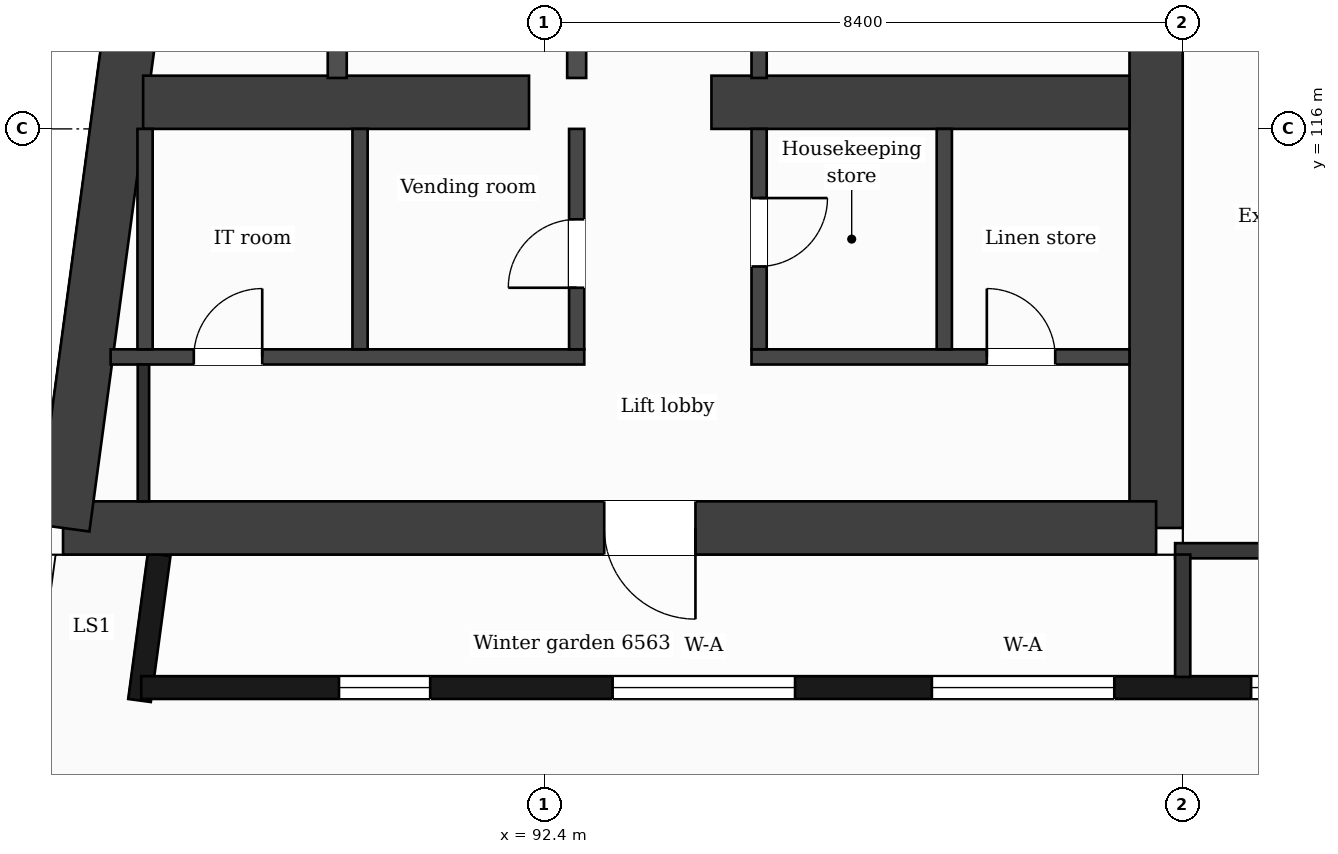
"""IFC4 building model, lengths in metres.
Left out: names, types, materials, properties, quantities, classifications, styles, units other than length and angle.
Written with IfcOpenShell. Run it as: python <this file> out.ifc"""

import sys

from ifc_helpers import new_model, si_unit, direction, frame, frame_2d, origin, place, context, subcontext, project, spatial, rectangle, extrude, element, fill, save


model = new_model("IFC4")
c1 = context("Model", 3, precision=1e-05, world=origin(), true_north=direction((0.0, 1.0)))
c2 = subcontext(c1, "Body", "Model", "MODEL_VIEW")
j1 = project(units=[si_unit("LENGTHUNIT", "METRE"), si_unit("PLANEANGLEUNIT", "RADIAN")], contexts=[c1])
p1 = place(None, origin())
s1 = spatial("IfcSite", under=j1, at=p1, CompositionType="ELEMENT")
p2 = place(p1, origin())
s2 = spatial("IfcBuilding", under=s1, at=p2, CompositionType="ELEMENT")
p3 = place(p2, frame((0.0, 0.0, 270.1)))
s3 = spatial("IfcBuildingStorey", under=s2, at=p3, CompositionType="ELEMENT", Elevation=270.1)
p4 = place(p3, frame((100.45, 132.05, 0.0), z_axis=(0.0, 0.0, 1.0), x_axis=(0.0, -1.0, 0.0)))
e1 = element("IfcWall", 1, at=p4, inside=s3, PredefinedType="SHEAR", context=c2, shape_type="SweptSolid", body=[
    extrude(rectangle(XDim=21.3, YDim=0.7, at=frame_2d((10.65, 0.0))), origin(), (0.0, 0.0, 1.0), 3.7),
])
p5 = place(p4, frame((7.9, 0.0, 0.0)))
e2 = element("IfcOpeningElement", 2, at=p5, cuts=e1, PredefinedType="OPENING", context=c2, shape_type="SweptSolid", body=[
    extrude(rectangle(XDim=1.4, YDim=2.1, at=frame_2d((0.7, 1.05))), frame((0.0, 0.36, 0.0), z_axis=(0.0, -1.0, 0.0), x_axis=(1.0, 0.0, 0.0)), (0.0, 0.0, 1.0), 0.72),
])
p6 = place(p3, frame((100.45, 110.75, 0.0), z_axis=(0.0, 0.0, 1.0), x_axis=(-1.0, 0.0, 0.0)))
e3 = element("IfcWall", 3, at=p6, inside=s3, PredefinedType="SHEAR", context=c2, shape_type="SweptSolid", body=[
    extrude(rectangle(XDim=14.38, YDim=0.7, at=frame_2d((7.19, 0.0))), origin(), (0.0, 0.0, 1.0), 3.7),
])
p7 = place(p6, frame((6.06, 0.0, 0.0)))
e4 = element("IfcOpeningElement", 4, at=p7, cuts=e3, PredefinedType="OPENING", context=c2, shape_type="SweptSolid", body=[
    extrude(rectangle(XDim=1.2, YDim=2.1, at=frame_2d((0.6, 1.05))), frame((0.0, 0.36, 0.0), z_axis=(0.0, -1.0, 0.0), x_axis=(1.0, 0.0, 0.0)), (0.0, 0.0, 1.0), 0.72),
])
p8 = place(p3, frame((86.07, 110.75, 0.0), z_axis=(0.0, 0.0, 1.0), x_axis=(0.133406218907, 0.991061441464, 0.0)))
e5 = element("IfcWall", 5, at=p8, inside=s3, PredefinedType="SHEAR", context=c2, shape_type="SweptSolid", body=[
    extrude(rectangle(XDim=21.492, YDim=0.7, at=frame_2d((10.746, 0.0))), origin(), (0.0, 0.0, 1.0), 3.7),
])
p9 = place(p3, frame((87.123, 116.35, 0.0), z_axis=(0.0, 0.0, 1.0), x_axis=(1.0, 0.0, 0.0)))
e6 = element("IfcWall", 6, at=p9, inside=s3, PredefinedType="SHEAR", context=c2, shape_type="SweptSolid", body=[
    extrude(rectangle(XDim=5.077, YDim=0.7, at=frame_2d((2.539, 0.0))), origin(), (0.0, 0.0, 1.0), 3.7),
])
p10 = place(p3, frame((94.6, 116.35, 0.0), z_axis=(0.0, 0.0, 1.0), x_axis=(1.0, 0.0, 0.0)))
e7 = element("IfcWall", 7, at=p10, inside=s3, PredefinedType="SHEAR", context=c2, shape_type="SweptSolid", body=[
    extrude(rectangle(XDim=5.5, YDim=0.7, at=frame_2d((2.75, 0.0))), origin(), (0.0, 0.0, 1.0), 3.7),
])
p11 = place(p3, frame((87.334, 110.4, 0.0), z_axis=(0.0, 0.0, 1.0), x_axis=(-0.13345962011, -0.991054251694, 0.0)))
e8 = element("IfcWall", 8, at=p11, inside=s3, PredefinedType="SOLIDWALL", context=c2, shape_type="SweptSolid", body=[
    extrude(rectangle(XDim=1.937, YDim=0.3, at=frame_2d((0.969, 0.0))), origin(), (0.0, 0.0, 1.0), 3.38),
])
p12 = place(p3, frame((87.099, 108.65, 0.0), z_axis=(0.0, 0.0, 1.0), x_axis=(1.0, 0.0, 0.0)))
e9 = element("IfcWall", 9, at=p12, inside=s3, PredefinedType="SOLIDWALL", context=c2, shape_type="SweptSolid", body=[
    extrude(rectangle(XDim=52.774, YDim=0.3, at=frame_2d((26.387, 0.0))), origin(), (0.0, 0.0, 1.0), 3.38),
])
p13 = place(p12, frame((2.602, 0.0, 0.9)))
e10 = element("IfcOpeningElement", 10, at=p13, cuts=e9, PredefinedType="OPENING", context=c2, shape_type="SweptSolid", body=[
    extrude(rectangle(XDim=1.2, YDim=2.1, at=frame_2d((0.6, 1.05))), frame((0.0, 0.16, 0.0), z_axis=(0.0, -1.0, 0.0), x_axis=(1.0, 0.0, 0.0)), (0.0, 0.0, 1.0), 0.32),
])
p14 = place(p12, frame((6.201, 0.0, 0.9)))
e11 = element("IfcOpeningElement", 11, at=p14, cuts=e9, PredefinedType="OPENING", context=c2, shape_type="SweptSolid", body=[
    extrude(rectangle(XDim=2.4, YDim=2.1, at=frame_2d((1.2, 1.05))), frame((0.0, 0.16, 0.0), z_axis=(0.0, -1.0, 0.0), x_axis=(1.0, 0.0, 0.0)), (0.0, 0.0, 1.0), 0.32),
])
p15 = place(p12, frame((10.401, 0.0, 0.9)))
e12 = element("IfcOpeningElement", 12, at=p15, cuts=e9, PredefinedType="OPENING", context=c2, shape_type="SweptSolid", body=[
    extrude(rectangle(XDim=2.4, YDim=2.1, at=frame_2d((1.2, 1.05))), frame((0.0, 0.16, 0.0), z_axis=(0.0, -1.0, 0.0), x_axis=(1.0, 0.0, 0.0)), (0.0, 0.0, 1.0), 0.32),
])
p16 = place(p12, frame((14.602, 0.0, 0.9)))
e13 = element("IfcOpeningElement", 13, at=p16, cuts=e9, PredefinedType="OPENING", context=c2, shape_type="SweptSolid", body=[
    extrude(rectangle(XDim=2.4, YDim=2.1, at=frame_2d((1.2, 1.05))), frame((0.0, 0.16, 0.0), z_axis=(0.0, -1.0, 0.0), x_axis=(1.0, 0.0, 0.0)), (0.0, 0.0, 1.0), 0.32),
])
p17 = place(p12, frame((18.802, 0.0, 0.9)))
e14 = element("IfcOpeningElement", 14, at=p17, cuts=e9, PredefinedType="OPENING", context=c2, shape_type="SweptSolid", body=[
    extrude(rectangle(XDim=2.4, YDim=2.1, at=frame_2d((1.2, 1.05))), frame((0.0, 0.16, 0.0), z_axis=(0.0, -1.0, 0.0), x_axis=(1.0, 0.0, 0.0)), (0.0, 0.0, 1.0), 0.32),
])
p18 = place(p12, frame((23.001, 0.0, 0.9)))
e15 = element("IfcOpeningElement", 15, at=p18, cuts=e9, PredefinedType="OPENING", context=c2, shape_type="SweptSolid", body=[
    extrude(rectangle(XDim=2.4, YDim=2.1, at=frame_2d((1.2, 1.05))), frame((0.0, 0.16, 0.0), z_axis=(0.0, -1.0, 0.0), x_axis=(1.0, 0.0, 0.0)), (0.0, 0.0, 1.0), 0.32),
])
p19 = place(p12, frame((27.802, 0.0, 0.9)))
e16 = element("IfcOpeningElement", 16, at=p19, cuts=e9, PredefinedType="OPENING", context=c2, shape_type="SweptSolid", body=[
    extrude(rectangle(XDim=1.2, YDim=2.1, at=frame_2d((0.6, 1.05))), frame((0.0, 0.16, 0.0), z_axis=(0.0, -1.0, 0.0), x_axis=(1.0, 0.0, 0.0)), (0.0, 0.0, 1.0), 0.32),
])
p20 = place(p12, frame((32.001, 0.0, 0.9)))
e17 = element("IfcOpeningElement", 17, at=p20, cuts=e9, PredefinedType="OPENING", context=c2, shape_type="SweptSolid", body=[
    extrude(rectangle(XDim=1.2, YDim=2.1, at=frame_2d((0.6, 1.05))), frame((0.0, 0.16, 0.0), z_axis=(0.0, -1.0, 0.0), x_axis=(1.0, 0.0, 0.0)), (0.0, 0.0, 1.0), 0.32),
])
p21 = place(p12, frame((35.302, 0.0, 0.0)))
e18 = element("IfcOpeningElement", 18, at=p21, cuts=e9, PredefinedType="OPENING", context=c2, shape_type="SweptSolid", body=[
    extrude(rectangle(XDim=1.2, YDim=2.4, at=frame_2d((0.6, 1.2))), frame((0.0, 0.16, 0.0), z_axis=(0.0, -1.0, 0.0), x_axis=(1.0, 0.0, 0.0)), (0.0, 0.0, 1.0), 0.32),
])
p22 = place(p12, frame((37.102, 0.0, 0.9)))
e19 = element("IfcOpeningElement", 19, at=p22, cuts=e9, PredefinedType="OPENING", context=c2, shape_type="SweptSolid", body=[
    extrude(rectangle(XDim=1.2, YDim=2.1, at=frame_2d((0.6, 1.05))), frame((0.0, 0.16, 0.0), z_axis=(0.0, -1.0, 0.0), x_axis=(1.0, 0.0, 0.0)), (0.0, 0.0, 1.0), 0.32),
])
p23 = place(p12, frame((39.802, 0.0, 0.9)))
e20 = element("IfcOpeningElement", 20, at=p23, cuts=e9, PredefinedType="OPENING", context=c2, shape_type="SweptSolid", body=[
    extrude(rectangle(XDim=2.4, YDim=2.1, at=frame_2d((1.2, 1.05))), frame((0.0, 0.16, 0.0), z_axis=(0.0, -1.0, 0.0), x_axis=(1.0, 0.0, 0.0)), (0.0, 0.0, 1.0), 0.32),
])
p24 = place(p12, frame((43.701, 0.0, 0.0)))
e21 = element("IfcOpeningElement", 21, at=p24, cuts=e9, PredefinedType="OPENING", context=c2, shape_type="SweptSolid", body=[
    extrude(rectangle(XDim=1.2, YDim=2.4, at=frame_2d((0.6, 1.2))), frame((0.0, 0.16, 0.0), z_axis=(0.0, -1.0, 0.0), x_axis=(1.0, 0.0, 0.0)), (0.0, 0.0, 1.0), 0.32),
])
p25 = place(p12, frame((45.501, 0.0, 0.9)))
e22 = element("IfcOpeningElement", 22, at=p25, cuts=e9, PredefinedType="OPENING", context=c2, shape_type="SweptSolid", body=[
    extrude(rectangle(XDim=1.2, YDim=2.1, at=frame_2d((0.6, 1.05))), frame((0.0, 0.16, 0.0), z_axis=(0.0, -1.0, 0.0), x_axis=(1.0, 0.0, 0.0)), (0.0, 0.0, 1.0), 0.32),
])
p26 = place(p12, frame((48.201, 0.0, 0.9)))
e23 = element("IfcOpeningElement", 23, at=p26, cuts=e9, PredefinedType="OPENING", context=c2, shape_type="SweptSolid", body=[
    extrude(rectangle(XDim=2.4, YDim=2.1, at=frame_2d((1.2, 1.05))), frame((0.0, 0.16, 0.0), z_axis=(0.0, -1.0, 0.0), x_axis=(1.0, 0.0, 0.0)), (0.0, 0.0, 1.0), 0.32),
])
p27 = place(p3, frame((100.7, 110.45, 0.0), z_axis=(0.0, 0.0, 1.0), x_axis=(1.0, 0.0, 0.0)))
e24 = element("IfcWall", 24, at=p27, inside=s3, PredefinedType="PARTITIONING", context=c2, shape_type="SweptSolid", body=[
    extrude(rectangle(XDim=25.4, YDim=0.2, at=frame_2d((12.7, 0.0))), origin(), (0.0, 0.0, 1.0), 3.38),
])
p28 = place(p3, frame((86.696, 113.0, 0.0), z_axis=(0.0, 0.0, 1.0), x_axis=(1.0, 0.0, 0.0)))
e25 = element("IfcWall", 25, at=p28, inside=s3, PredefinedType="PARTITIONING", context=c2, shape_type="SweptSolid", body=[
    extrude(rectangle(XDim=6.231, YDim=0.2, at=frame_2d((3.116, 0.0))), origin(), (0.0, 0.0, 1.0), 3.38),
])
p29 = place(p28, frame((1.094, 0.0, 0.0)))
e26 = element("IfcOpeningElement", 26, at=p29, cuts=e25, PredefinedType="OPENING", context=c2, shape_type="SweptSolid", body=[
    extrude(rectangle(XDim=0.9, YDim=2.1, at=frame_2d((0.45, 1.05))), frame((0.0, 0.11, 0.0), z_axis=(0.0, -1.0, 0.0), x_axis=(1.0, 0.0, 0.0)), (0.0, 0.0, 1.0), 0.22),
])
p30 = place(p3, frame((95.127, 113.0, 0.0), z_axis=(0.0, 0.0, 1.0), x_axis=(1.0, 0.0, 0.0)))
e27 = element("IfcWall", 27, at=p30, inside=s3, PredefinedType="PARTITIONING", context=c2, shape_type="SweptSolid", body=[
    extrude(rectangle(XDim=4.973, YDim=0.2, at=frame_2d((2.487, 0.0))), origin(), (0.0, 0.0, 1.0), 3.38),
])
p31 = place(p30, frame((3.096, 0.0, 0.0)))
e28 = element("IfcOpeningElement", 28, at=p31, cuts=e27, PredefinedType="OPENING", context=c2, shape_type="SweptSolid", body=[
    extrude(rectangle(XDim=0.9, YDim=2.1, at=frame_2d((0.45, 1.05))), frame((0.0, 0.11, 0.0), z_axis=(0.0, -1.0, 0.0), x_axis=(1.0, 0.0, 0.0)), (0.0, 0.0, 1.0), 0.22),
])
p32 = place(p3, frame((87.148, 113.1, 0.0), z_axis=(0.0, 0.0, 1.0), x_axis=(0.0, 1.0, 0.0)))
e29 = element("IfcWall", 29, at=p32, inside=s3, PredefinedType="PARTITIONING", context=c2, shape_type="SweptSolid", body=[
    extrude(rectangle(XDim=2.9, YDim=0.2, at=frame_2d((1.45, 0.0))), origin(), (0.0, 0.0, 1.0), 3.38),
])
p33 = place(p3, frame((87.127, 111.1, 0.0), z_axis=(0.0, 0.0, 1.0), x_axis=(0.0, 1.0, 0.0)))
e30 = element("IfcWall", 30, at=p33, inside=s3, PredefinedType="PARTITIONING", context=c2, shape_type="SweptSolid", body=[
    extrude(rectangle(XDim=1.8, YDim=0.15, at=frame_2d((0.9, 0.0))), origin(), (0.0, 0.0, 1.0), 3.38),
])
p34 = place(p3, frame((89.677, 116.67, 0.0), z_axis=(0.0, 0.0, 1.0), x_axis=(0.0, 1.0, 0.0)))
e31 = element("IfcWall", 31, at=p34, inside=s3, PredefinedType="PARTITIONING", context=c2, shape_type="SweptSolid", body=[
    extrude(rectangle(XDim=7.155, YDim=0.25, at=frame_2d((3.578, 0.0))), origin(), (0.0, 0.0, 1.0), 3.38),
])
p35 = place(p3, frame((89.977, 113.1, 0.0), z_axis=(0.0, 0.0, 1.0), x_axis=(0.0, 1.0, 0.0)))
e32 = element("IfcWall", 32, at=p35, inside=s3, PredefinedType="PARTITIONING", context=c2, shape_type="SweptSolid", body=[
    extrude(rectangle(XDim=2.9, YDim=0.2, at=frame_2d((1.45, 0.0))), origin(), (0.0, 0.0, 1.0), 3.38),
])
p36 = place(p3, frame((92.827, 113.1, 0.0), z_axis=(0.0, 0.0, 1.0), x_axis=(0.0, 1.0, 0.0)))
e33 = element("IfcWall", 33, at=p36, inside=s3, PredefinedType="PARTITIONING", context=c2, shape_type="SweptSolid", body=[
    extrude(rectangle(XDim=2.9, YDim=0.2, at=frame_2d((1.45, 0.0))), origin(), (0.0, 0.0, 1.0), 3.38),
])
p37 = place(p36, frame((0.81, 0.0, 0.0)))
e34 = element("IfcOpeningElement", 34, at=p37, cuts=e33, PredefinedType="OPENING", context=c2, shape_type="SweptSolid", body=[
    extrude(rectangle(XDim=0.9, YDim=2.1, at=frame_2d((0.45, 1.05))), frame((0.0, 0.11, 0.0), z_axis=(0.0, -1.0, 0.0), x_axis=(1.0, 0.0, 0.0)), (0.0, 0.0, 1.0), 0.22),
])
p38 = place(p3, frame((92.827, 116.67, 0.0), z_axis=(0.0, 0.0, 1.0), x_axis=(0.0, 1.0, 0.0)))
e35 = element("IfcWall", 35, at=p38, inside=s3, PredefinedType="PARTITIONING", context=c2, shape_type="SweptSolid", body=[
    extrude(rectangle(XDim=7.155, YDim=0.25, at=frame_2d((3.578, 0.0))), origin(), (0.0, 0.0, 1.0), 3.38),
])
p39 = place(p38, frame((5.855, 0.0, 0.0)))
e36 = element("IfcOpeningElement", 36, at=p39, cuts=e35, PredefinedType="OPENING", context=c2, shape_type="SweptSolid", body=[
    extrude(rectangle(XDim=0.95, YDim=2.1, at=frame_2d((0.475, 1.05))), frame((0.0, 0.135, 0.0), z_axis=(0.0, -1.0, 0.0), x_axis=(1.0, 0.0, 0.0)), (0.0, 0.0, 1.0), 0.27),
])
p40 = place(p3, frame((95.227, 113.1, 0.0), z_axis=(0.0, 0.0, 1.0), x_axis=(0.0, 1.0, 0.0)))
e37 = element("IfcWall", 37, at=p40, inside=s3, PredefinedType="PARTITIONING", context=c2, shape_type="SweptSolid", body=[
    extrude(rectangle(XDim=2.9, YDim=0.2, at=frame_2d((1.45, 0.0))), origin(), (0.0, 0.0, 1.0), 3.38),
])
p41 = place(p40, frame((1.09, 0.0, 0.0)))
e38 = element("IfcOpeningElement", 38, at=p41, cuts=e37, PredefinedType="OPENING", context=c2, shape_type="SweptSolid", body=[
    extrude(rectangle(XDim=0.9, YDim=2.1, at=frame_2d((0.45, 1.05))), frame((0.0, 0.11, 0.0), z_axis=(0.0, -1.0, 0.0), x_axis=(1.0, 0.0, 0.0)), (0.0, 0.0, 1.0), 0.22),
])
p42 = place(p3, frame((95.227, 116.67, 0.0), z_axis=(0.0, 0.0, 1.0), x_axis=(0.0, 1.0, 0.0)))
e39 = element("IfcWall", 39, at=p42, inside=s3, PredefinedType="PARTITIONING", context=c2, shape_type="SweptSolid", body=[
    extrude(rectangle(XDim=5.33, YDim=0.2, at=frame_2d((2.665, 0.0))), origin(), (0.0, 0.0, 1.0), 3.38),
])
p43 = place(p42, frame((0.88, 0.0, 0.0)))
e40 = element("IfcOpeningElement", 40, at=p43, cuts=e39, PredefinedType="OPENING", context=c2, shape_type="SweptSolid", body=[
    extrude(rectangle(XDim=0.9, YDim=2.1, at=frame_2d((0.45, 1.05))), frame((0.0, 0.11, 0.0), z_axis=(0.0, -1.0, 0.0), x_axis=(1.0, 0.0, 0.0)), (0.0, 0.0, 1.0), 0.22),
])
p44 = place(p3, frame((97.664, 113.1, 0.0), z_axis=(0.0, 0.0, 1.0), x_axis=(0.0, 1.0, 0.0)))
e41 = element("IfcWall", 41, at=p44, inside=s3, PredefinedType="PARTITIONING", context=c2, shape_type="SweptSolid", body=[
    extrude(rectangle(XDim=2.9, YDim=0.2, at=frame_2d((1.45, 0.0))), origin(), (0.0, 0.0, 1.0), 3.38),
])
p45 = place(p3, frame((100.8, 108.79, 0.0), z_axis=(0.0, 0.0, 1.0), x_axis=(0.0, 1.0, 0.0)))
e42 = element("IfcWall", 42, at=p45, inside=s3, PredefinedType="PARTITIONING", context=c2, shape_type="SweptSolid", body=[
    extrude(rectangle(XDim=1.61, YDim=0.2, at=frame_2d((0.805, 0.0))), origin(), (0.0, 0.0, 1.0), 3.38),
])
p46 = place(p13, origin())
e43 = element("IfcWindow", 43, at=p46, inside=s3, PartitioningType="SINGLE_PANEL", PredefinedType="WINDOW", context=c2, shape_type="SweptSolid", body=[
    extrude(rectangle(XDim=1.2, YDim=2.1, at=frame_2d((0.6, 1.05))), frame((0.0, 0.03, 0.0), z_axis=(0.0, -1.0, 0.0), x_axis=(1.0, 0.0, 0.0)), (0.0, 0.0, 1.0), 0.06),
])
fill(e10, e43)
p47 = place(p14, origin())
e44 = element("IfcWindow", 44, at=p47, inside=s3, PartitioningType="SINGLE_PANEL", PredefinedType="WINDOW", context=c2, shape_type="SweptSolid", body=[
    extrude(rectangle(XDim=2.4, YDim=2.1, at=frame_2d((1.2, 1.05))), frame((0.0, 0.03, 0.0), z_axis=(0.0, -1.0, 0.0), x_axis=(1.0, 0.0, 0.0)), (0.0, 0.0, 1.0), 0.06),
])
fill(e11, e44)
p48 = place(p15, origin())
e45 = element("IfcWindow", 45, at=p48, inside=s3, PartitioningType="SINGLE_PANEL", PredefinedType="WINDOW", context=c2, shape_type="SweptSolid", body=[
    extrude(rectangle(XDim=2.4, YDim=2.1, at=frame_2d((1.2, 1.05))), frame((0.0, 0.03, 0.0), z_axis=(0.0, -1.0, 0.0), x_axis=(1.0, 0.0, 0.0)), (0.0, 0.0, 1.0), 0.06),
])
fill(e12, e45)
p49 = place(p16, origin())
e46 = element("IfcWindow", 46, at=p49, inside=s3, PartitioningType="SINGLE_PANEL", PredefinedType="WINDOW", context=c2, shape_type="SweptSolid", body=[
    extrude(rectangle(XDim=2.4, YDim=2.1, at=frame_2d((1.2, 1.05))), frame((0.0, 0.03, 0.0), z_axis=(0.0, -1.0, 0.0), x_axis=(1.0, 0.0, 0.0)), (0.0, 0.0, 1.0), 0.06),
])
fill(e13, e46)
p50 = place(p29, origin())
e47 = element("IfcDoor", 47, at=p50, inside=s3, OperationType="SINGLE_SWING_RIGHT", PredefinedType="DOOR", context=c2, shape_type="SweptSolid", body=[
    extrude(rectangle(XDim=0.9, YDim=2.1, at=frame_2d((0.45, 1.05))), frame((0.0, 0.025, 0.0), z_axis=(0.0, -1.0, 0.0), x_axis=(1.0, 0.0, 0.0)), (0.0, 0.0, 1.0), 0.05),
])
fill(e26, e47)
p51 = place(p37, origin())
e48 = element("IfcDoor", 48, at=p51, inside=s3, OperationType="SINGLE_SWING_LEFT", PredefinedType="DOOR", context=c2, shape_type="SweptSolid", body=[
    extrude(rectangle(XDim=0.9, YDim=2.1, at=frame_2d((0.45, 1.05))), frame((0.0, 0.025, 0.0), z_axis=(0.0, -1.0, 0.0), x_axis=(1.0, 0.0, 0.0)), (0.0, 0.0, 1.0), 0.05),
])
fill(e34, e48)
p52 = place(p41, origin())
e49 = element("IfcDoor", 49, at=p52, inside=s3, OperationType="SINGLE_SWING_RIGHT", PredefinedType="DOOR", context=c2, shape_type="SweptSolid", body=[
    extrude(rectangle(XDim=0.9, YDim=2.1, at=frame_2d((0.45, 1.05))), frame((0.0, 0.025, 0.0), z_axis=(0.0, -1.0, 0.0), x_axis=(1.0, 0.0, 0.0)), (0.0, 0.0, 1.0), 0.05),
])
fill(e38, e49)
p53 = place(p31, origin())
e50 = element("IfcDoor", 50, at=p53, inside=s3, OperationType="SINGLE_SWING_LEFT", PredefinedType="DOOR", context=c2, shape_type="SweptSolid", body=[
    extrude(rectangle(XDim=0.9, YDim=2.1, at=frame_2d((0.45, 1.05))), frame((0.0, 0.025, 0.0), z_axis=(0.0, -1.0, 0.0), x_axis=(1.0, 0.0, 0.0)), (0.0, 0.0, 1.0), 0.05),
])
fill(e28, e50)
p54 = place(p7, origin())
e51 = element("IfcDoor", 51, at=p54, inside=s3, OperationType="SINGLE_SWING_LEFT", PredefinedType="DOOR", context=c2, shape_type="SweptSolid", body=[
    extrude(rectangle(XDim=1.2, YDim=2.1, at=frame_2d((0.6, 1.05))), frame((0.0, 0.025, 0.0), z_axis=(0.0, -1.0, 0.0), x_axis=(1.0, 0.0, 0.0)), (0.0, 0.0, 1.0), 0.05),
])
fill(e4, e51)
save(model, sys.argv[1])
